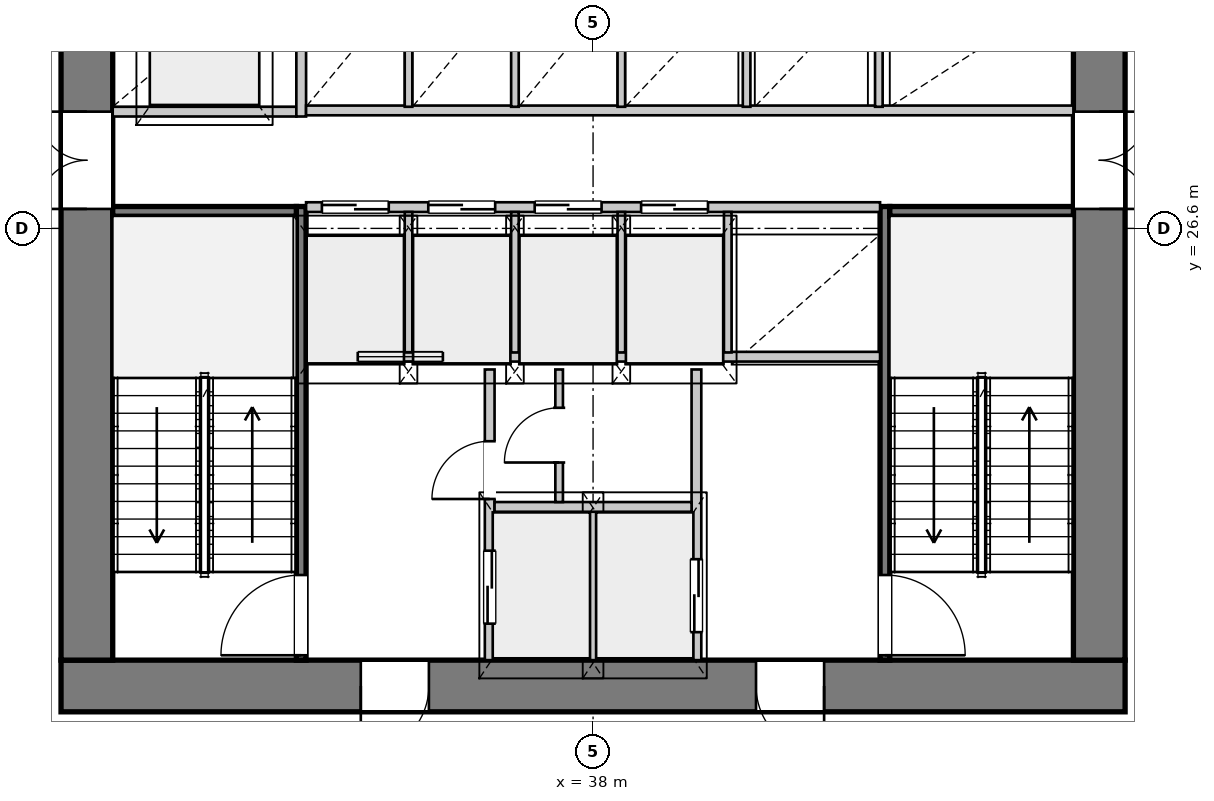
"""IFC4 building model, lengths in metres.
Left out: names, types, materials, properties, quantities, classifications, styles, units other than length and angle.
Written with IfcOpenShell. Run it as: python <this file> out.ifc"""

import sys

from ifc_helpers import new_model, si_unit, direction, frame, frame_2d, origin, place, context, subcontext, project, spatial, rectangle, extrude, source, transform, mapped, element, fill, save


model = new_model("IFC4")
c1 = context("Model", 3, precision=1e-05, world=origin(), true_north=direction((0.0, 1.0)))
c2 = subcontext(c1, "Body", "Model", "MODEL_VIEW")
j1 = project(units=[si_unit("LENGTHUNIT", "METRE"), si_unit("PLANEANGLEUNIT", "RADIAN")], contexts=[c1])
p1 = place(None, origin())
s1 = spatial("IfcSite", under=j1, at=p1, CompositionType="ELEMENT")
p2 = place(p1, origin())
s2 = spatial("IfcBuilding", under=s1, at=p2, CompositionType="ELEMENT")
p3 = place(p2, frame((0.0, 0.0, 75.9)))
s3 = spatial("IfcBuildingStorey", under=s2, at=p3, CompositionType="ELEMENT", Elevation=75.9)
p4 = place(p3, frame((46.75, 19.075, 0.0), z_axis=(0.0, 0.0, 1.0), x_axis=(-1.0, 0.0, 0.0)))
e1 = element("IfcWall", 1, at=p4, inside=s3, PredefinedType="SHEAR", context=c2, shape_type="SweptSolid", body=[
    extrude(rectangle(XDim=17.5, YDim=0.85, at=frame_2d((8.75, 0.0))), origin(), (0.0, 0.0, 1.0), 3.58),
])
p5 = place(p4, frame((4.95, 0.0, 0.0)))
e2 = element("IfcOpeningElement", 2, at=p5, cuts=e1, PredefinedType="OPENING", context=c2, shape_type="SweptSolid", body=[
    extrude(rectangle(XDim=1.12, YDim=2.25, at=frame_2d((0.56, 1.125))), frame((0.0, 0.435, 0.0), z_axis=(0.0, -1.0, 0.0), x_axis=(1.0, 0.0, 0.0)), (0.0, 0.0, 1.0), 0.87),
])
p6 = place(p4, frame((11.45, 0.0, 0.0)))
e3 = element("IfcOpeningElement", 3, at=p6, cuts=e1, PredefinedType="OPENING", context=c2, shape_type="SweptSolid", body=[
    extrude(rectangle(XDim=1.12, YDim=2.25, at=frame_2d((0.56, 1.125))), frame((0.0, 0.435, 0.0), z_axis=(0.0, -1.0, 0.0), x_axis=(1.0, 0.0, 0.0)), (0.0, 0.0, 1.0), 0.87),
])
p7 = place(p3, frame((29.675, 19.5, 0.0), z_axis=(0.0, 0.0, 1.0), x_axis=(0.0, 1.0, 0.0)))
e4 = element("IfcWall", 4, at=p7, inside=s3, PredefinedType="SHEAR", context=c2, shape_type="SweptSolid", body=[
    extrude(rectangle(XDim=14.2, YDim=0.85, at=frame_2d((7.1, 0.0))), origin(), (0.0, 0.0, 1.0), 3.58),
])
p8 = place(p7, frame((7.42, 0.0, 0.0)))
e5 = element("IfcOpeningElement", 5, at=p8, cuts=e4, PredefinedType="OPENING", context=c2, shape_type="SweptSolid", body=[
    extrude(rectangle(XDim=1.6, YDim=2.2, at=frame_2d((0.8, 1.1))), frame((0.0, 0.435, 0.0), z_axis=(0.0, -1.0, 0.0), x_axis=(1.0, 0.0, 0.0)), (0.0, 0.0, 1.0), 0.87),
])
p9 = place(p3, frame((46.325, 33.7, 0.0), z_axis=(0.0, 0.0, 1.0), x_axis=(0.0, -1.0, 0.0)))
e6 = element("IfcWall", 6, at=p9, inside=s3, PredefinedType="SHEAR", context=c2, shape_type="SweptSolid", body=[
    extrude(rectangle(XDim=14.2, YDim=0.85, at=frame_2d((7.1, 0.0))), origin(), (0.0, 0.0, 1.0), 3.58),
])
p10 = place(p9, frame((5.18, 0.0, 0.0)))
e7 = element("IfcOpeningElement", 7, at=p10, cuts=e6, PredefinedType="OPENING", context=c2, shape_type="SweptSolid", body=[
    extrude(rectangle(XDim=1.6, YDim=2.2, at=frame_2d((0.8, 1.1))), frame((0.0, 0.435, 0.0), z_axis=(0.0, -1.0, 0.0), x_axis=(1.0, 0.0, 0.0)), (0.0, 0.0, 1.0), 0.87),
])
p11 = place(p3, frame((33.2, 19.5, 0.0), z_axis=(0.0, 0.0, 1.0), x_axis=(0.0, 1.0, 0.0)))
e8 = element("IfcWall", 8, at=p11, inside=s3, PredefinedType="PARTITIONING", context=c2, shape_type="SweptSolid", body=[
    extrude(rectangle(XDim=7.46, YDim=0.16, at=frame_2d((3.73, 0.0))), origin(), (0.0, 0.0, 1.0), 3.58),
])
p12 = place(p11, frame((0.08, 0.0, 0.0)))
e9 = element("IfcOpeningElement", 9, at=p12, cuts=e8, PredefinedType="OPENING", context=c2, shape_type="SweptSolid", body=[
    extrude(rectangle(XDim=1.32, YDim=2.2, at=frame_2d((0.66, 1.1))), frame((0.0, 0.09, 0.0), z_axis=(0.0, -1.0, 0.0), x_axis=(1.0, 0.0, 0.0)), (0.0, 0.0, 1.0), 0.18),
])
p13 = place(p3, frame((30.1, 26.88, 0.0), z_axis=(0.0, 0.0, 1.0), x_axis=(1.0, 0.0, 0.0)))
e10 = element("IfcWall", 10, at=p13, inside=s3, PredefinedType="PARTITIONING", context=c2, shape_type="SweptSolid", body=[
    extrude(rectangle(XDim=3.02, YDim=0.16, at=frame_2d((1.51, 0.0))), origin(), (0.0, 0.0, 1.0), 3.58),
])
p14 = place(p3, frame((42.8, 26.96, 0.0), z_axis=(0.0, 0.0, 1.0), x_axis=(0.0, -1.0, 0.0)))
e11 = element("IfcWall", 11, at=p14, inside=s3, PredefinedType="PARTITIONING", context=c2, shape_type="SweptSolid", body=[
    extrude(rectangle(XDim=7.46, YDim=0.16, at=frame_2d((3.73, 0.0))), origin(), (0.0, 0.0, 1.0), 3.58),
])
p15 = place(p14, frame((6.06, 0.0, 0.0)))
e12 = element("IfcOpeningElement", 12, at=p15, cuts=e11, PredefinedType="OPENING", context=c2, shape_type="SweptSolid", body=[
    extrude(rectangle(XDim=1.32, YDim=2.2, at=frame_2d((0.66, 1.1))), frame((0.0, 0.09, 0.0), z_axis=(0.0, -1.0, 0.0), x_axis=(1.0, 0.0, 0.0)), (0.0, 0.0, 1.0), 0.18),
])
p16 = place(p3, frame((42.88, 26.88, 0.0), z_axis=(0.0, 0.0, 1.0), x_axis=(1.0, 0.0, 0.0)))
e13 = element("IfcWall", 13, at=p16, inside=s3, PredefinedType="PARTITIONING", context=c2, shape_type="SweptSolid", body=[
    extrude(rectangle(XDim=3.02, YDim=0.16, at=frame_2d((1.51, 0.0))), origin(), (0.0, 0.0, 1.0), 3.58),
])
p17 = place(p3, frame((36.3, 19.5, 0.0), z_axis=(0.0, 0.0, 1.0), x_axis=(0.0, 1.0, 0.0)))
e14 = element("IfcWall", 14, at=p17, inside=s3, PredefinedType="PARTITIONING", context=c2, shape_type="SweptSolid", body=[
    extrude(rectangle(XDim=4.78, YDim=0.16, at=frame_2d((2.39, 0.0))), origin(), (0.0, 0.0, 1.0), 3.58),
])
p18 = place(p17, frame((0.6, 0.0, 0.0)))
e15 = element("IfcOpeningElement", 15, at=p18, cuts=e14, PredefinedType="OPENING", context=c2, shape_type="SweptSolid", body=[
    extrude(rectangle(XDim=1.2, YDim=2.2, at=frame_2d((0.6, 1.1))), frame((0.0, 0.09, 0.0), z_axis=(0.0, -1.0, 0.0), x_axis=(1.0, 0.0, 0.0)), (0.0, 0.0, 1.0), 0.18),
])
p19 = place(p17, frame((2.65, 0.0, 0.0)))
e16 = element("IfcOpeningElement", 16, at=p19, cuts=e14, PredefinedType="OPENING", context=c2, shape_type="SweptSolid", body=[
    extrude(rectangle(XDim=0.95, YDim=2.1, at=frame_2d((0.475, 1.05))), frame((0.0, 0.09, 0.0), z_axis=(0.0, -1.0, 0.0), x_axis=(1.0, 0.0, 0.0)), (0.0, 0.0, 1.0), 0.18),
])
p20 = place(p3, frame((39.7, 24.28, 0.0), z_axis=(0.0, 0.0, 1.0), x_axis=(0.0, -1.0, 0.0)))
e17 = element("IfcWall", 17, at=p20, inside=s3, PredefinedType="PARTITIONING", context=c2, shape_type="SweptSolid", body=[
    extrude(rectangle(XDim=4.78, YDim=0.16, at=frame_2d((2.39, 0.0))), origin(), (0.0, 0.0, 1.0), 3.58),
])
p21 = place(p20, frame((3.12, 0.0, 0.0)))
e18 = element("IfcOpeningElement", 18, at=p21, cuts=e17, PredefinedType="OPENING", context=c2, shape_type="SweptSolid", body=[
    extrude(rectangle(XDim=1.2, YDim=2.2, at=frame_2d((0.6, 1.1))), frame((0.0, 0.09, 0.0), z_axis=(0.0, -1.0, 0.0), x_axis=(1.0, 0.0, 0.0)), (0.0, 0.0, 1.0), 0.18),
])
p22 = place(p3, frame((38.0, 19.5, 0.0), z_axis=(0.0, 0.0, 1.0), x_axis=(0.0, 1.0, 0.0)))
e19 = element("IfcWall", 19, at=p22, inside=s3, PredefinedType="PARTITIONING", context=c2, shape_type="SweptSolid", body=[
    extrude(rectangle(XDim=2.46, YDim=0.125, at=frame_2d((1.23, 0.0))), origin(), (0.0, 0.0, 1.0), 3.58),
])
p23 = place(p3, frame((36.38, 22.02, 0.0), z_axis=(0.0, 0.0, 1.0), x_axis=(1.0, 0.0, 0.0)))
e20 = element("IfcWall", 20, at=p23, inside=s3, PredefinedType="PARTITIONING", context=c2, shape_type="SweptSolid", body=[
    extrude(rectangle(XDim=3.24, YDim=0.16, at=frame_2d((1.62, 0.0))), origin(), (0.0, 0.0, 1.0), 3.58),
])
p24 = place(p3, frame((33.28, 24.49, 0.0), z_axis=(0.0, 0.0, 1.0), x_axis=(1.0, 0.0, 0.0)))
e21 = element("IfcWall", 21, at=p24, inside=s3, PredefinedType="PARTITIONING", context=c2, shape_type="SweptSolid", body=[
    extrude(rectangle(XDim=9.44, YDim=0.16, at=frame_2d((4.72, 0.0))), origin(), (0.0, 0.0, 1.0), 3.58),
])
p25 = place(p24, frame((0.85, 0.0, 0.95)))
e22 = element("IfcOpeningElement", 22, at=p25, cuts=e21, PredefinedType="OPENING", context=c2, shape_type="SweptSolid", body=[
    extrude(rectangle(XDim=1.4, YDim=1.8, at=frame_2d((0.7, 0.9))), frame((0.0, 0.09, 0.0), z_axis=(0.0, -1.0, 0.0), x_axis=(1.0, 0.0, 0.0)), (0.0, 0.0, 1.0), 0.18),
])
p26 = place(p3, frame((37.442, 22.1, 0.0), z_axis=(0.0, 0.0, 1.0), x_axis=(0.0, 1.0, 0.0)))
e23 = element("IfcWall", 23, at=p26, inside=s3, PredefinedType="PARTITIONING", context=c2, shape_type="SweptSolid", body=[
    extrude(rectangle(XDim=2.18, YDim=0.125, at=frame_2d((1.09, 0.0))), origin(), (0.0, 0.0, 1.0), 3.58),
])
p27 = place(p26, frame((0.65, 0.0, 0.0)))
e24 = element("IfcOpeningElement", 24, at=p27, cuts=e23, PredefinedType="OPENING", context=c2, shape_type="SweptSolid", body=[
    extrude(rectangle(XDim=0.9, YDim=2.1, at=frame_2d((0.45, 1.05))), frame((0.0, 0.073, 0.0), z_axis=(0.0, -1.0, 0.0), x_axis=(1.0, 0.0, 0.0)), (0.0, 0.0, 1.0), 0.145),
])
p28 = place(p3, frame((30.1, 28.52, 0.0), z_axis=(0.0, 0.0, 1.0), x_axis=(1.0, 0.0, 0.0)))
e25 = element("IfcWall", 25, at=p28, inside=s3, PredefinedType="PARTITIONING", context=c2, shape_type="SweptSolid", body=[
    extrude(rectangle(XDim=3.02, YDim=0.16, at=frame_2d((1.51, 0.0))), origin(), (0.0, 0.0, 1.0), 3.58),
])
p29 = place(p3, frame((33.2, 28.44, 0.0), z_axis=(0.0, 0.0, 1.0), x_axis=(0.0, 1.0, 0.0)))
e26 = element("IfcWall", 26, at=p29, inside=s3, PredefinedType="PARTITIONING", context=c2, shape_type="SweptSolid", body=[
    extrude(rectangle(XDim=5.26, YDim=0.16, at=frame_2d((2.63, 0.0))), origin(), (0.0, 0.0, 1.0), 3.58),
])
p30 = place(p3, frame((33.28, 26.95, 0.0), z_axis=(0.0, 0.0, 1.0), x_axis=(1.0, 0.0, 0.0)))
e27 = element("IfcWall", 27, at=p30, inside=s3, PredefinedType="PARTITIONING", context=c2, shape_type="SweptSolid", body=[
    extrude(rectangle(XDim=9.44, YDim=0.16, at=frame_2d((4.72, 0.0))), origin(), (0.0, 0.0, 1.0), 3.58),
])
p31 = place(p30, frame((0.26, 0.0, 0.0)))
e28 = element("IfcOpeningElement", 28, at=p31, cuts=e27, PredefinedType="OPENING", context=c2, shape_type="SweptSolid", body=[
    extrude(rectangle(XDim=1.1, YDim=2.2, at=frame_2d((0.55, 1.1))), frame((0.0, 0.09, 0.0), z_axis=(0.0, -1.0, 0.0), x_axis=(1.0, 0.0, 0.0)), (0.0, 0.0, 1.0), 0.18),
])
p32 = place(p30, frame((2.01, 0.0, 0.0)))
e29 = element("IfcOpeningElement", 29, at=p32, cuts=e27, PredefinedType="OPENING", context=c2, shape_type="SweptSolid", body=[
    extrude(rectangle(XDim=1.1, YDim=2.2, at=frame_2d((0.55, 1.1))), frame((0.0, 0.09, 0.0), z_axis=(0.0, -1.0, 0.0), x_axis=(1.0, 0.0, 0.0)), (0.0, 0.0, 1.0), 0.18),
])
p33 = place(p30, frame((3.76, 0.0, 0.0)))
e30 = element("IfcOpeningElement", 30, at=p33, cuts=e27, PredefinedType="OPENING", context=c2, shape_type="SweptSolid", body=[
    extrude(rectangle(XDim=1.1, YDim=2.2, at=frame_2d((0.55, 1.1))), frame((0.0, 0.09, 0.0), z_axis=(0.0, -1.0, 0.0), x_axis=(1.0, 0.0, 0.0)), (0.0, 0.0, 1.0), 0.18),
])
p34 = place(p30, frame((5.51, 0.0, 0.0)))
e31 = element("IfcOpeningElement", 31, at=p34, cuts=e27, PredefinedType="OPENING", context=c2, shape_type="SweptSolid", body=[
    extrude(rectangle(XDim=1.1, YDim=2.2, at=frame_2d((0.55, 1.1))), frame((0.0, 0.09, 0.0), z_axis=(0.0, -1.0, 0.0), x_axis=(1.0, 0.0, 0.0)), (0.0, 0.0, 1.0), 0.18),
])
for number, where, z_axis, x_axis in (
    (32, (34.965, 24.56, 0.0), (0.0, 0.0, 1.0), (0.0, 1.0, 0.0)),
    (33, (36.715, 24.56, 0.0), (0.0, 0.0, 1.0), (0.0, 1.0, 0.0)),
    (34, (38.465, 24.56, 0.0), (0.0, 0.0, 1.0), (0.0, 1.0, 0.0)),
    (35, (40.215, 24.56, 0.0), (0.0, 0.0, 1.0), (0.0, 1.0, 0.0)),
):
    element("IfcWall", number, at=place(p3, frame(where, z_axis=z_axis, x_axis=x_axis)), inside=s3, PredefinedType="PARTITIONING", context=c2, shape_type="SweptSolid", body=[
        extrude(rectangle(XDim=2.31, YDim=0.125, at=frame_2d((1.155, 0.0))), origin(), (0.0, 0.0, 1.0), 3.58),
    ])
p35 = place(p3, frame((33.28, 28.54, 0.0), z_axis=(0.0, 0.0, 1.0), x_axis=(1.0, 0.0, 0.0)))
e36 = element("IfcWall", 36, at=p35, inside=s3, PredefinedType="PARTITIONING", context=c2, shape_type="SweptSolid", body=[
    extrude(rectangle(XDim=12.62, YDim=0.16, at=frame_2d((6.31, 0.0))), origin(), (0.0, 0.0, 1.0), 3.58),
])
for number, where, z_axis, x_axis in (
    (37, (34.965, 28.6, 0.0), (0.0, 0.0, 1.0), (0.0, 1.0, 0.0)),
    (38, (36.715, 28.6, 0.0), (0.0, 0.0, 1.0), (0.0, 1.0, 0.0)),
    (39, (38.465, 28.6, 0.0), (0.0, 0.0, 1.0), (0.0, 1.0, 0.0)),
    (40, (40.525, 28.6, 0.0), (0.0, 0.0, 1.0), (0.0, 1.0, 0.0)),
    (41, (42.7, 28.6, 0.0), (0.0, 0.0, 1.0), (0.0, 1.0, 0.0)),
):
    element("IfcWall", number, at=place(p3, frame(where, z_axis=z_axis, x_axis=x_axis)), inside=s3, PredefinedType="PARTITIONING", context=c2, shape_type="SweptSolid", body=[
        extrude(rectangle(XDim=1.92, YDim=0.125, at=frame_2d((0.96, 0.0))), origin(), (0.0, 0.0, 1.0), 3.58),
    ])
m1 = source(origin(), c2, "Body", "SweptSolid", [
    extrude(rectangle(XDim=1.12, YDim=2.25, at=frame_2d((0.56, 1.125))), frame((0.0, 0.025, 0.0), z_axis=(0.0, -1.0, 0.0), x_axis=(1.0, 0.0, 0.0)), (0.0, 0.0, 1.0), 0.05),
])
p36 = place(p5, origin())
e42 = element("IfcDoor", 42, at=p36, inside=s3, OperationType="SINGLE_SWING_LEFT", PredefinedType="DOOR", context=c2, shape_type="MappedRepresentation", body=[
    mapped(m1, transform((0.0, 0.0, 0.0), x_axis=(1.0, 0.0, 0.0), y_axis=(0.0, 1.0, 0.0), z_axis=(0.0, 0.0, 1.0), scale=1.0)),
])
fill(e2, e42)
p37 = place(p6, origin())
e43 = element("IfcDoor", 43, at=p37, inside=s3, OperationType="SINGLE_SWING_RIGHT", PredefinedType="DOOR", context=c2, shape_type="MappedRepresentation", body=[
    mapped(m1, transform((0.0, 0.0, 0.0), x_axis=(1.0, 0.0, 0.0), y_axis=(0.0, 1.0, 0.0), z_axis=(0.0, 0.0, 1.0), scale=1.0)),
])
fill(e3, e43)
m2 = source(origin(), c2, "Body", "SweptSolid", [
    extrude(rectangle(XDim=1.6, YDim=2.2, at=frame_2d((0.8, 1.1))), frame((0.0, 0.025, 0.0), z_axis=(0.0, -1.0, 0.0), x_axis=(1.0, 0.0, 0.0)), (0.0, 0.0, 1.0), 0.05),
])
p38 = place(p8, origin())
e44 = element("IfcDoor", 44, at=p38, inside=s3, OperationType="DOUBLE_DOOR_SINGLE_SWING", PredefinedType="DOOR", context=c2, shape_type="MappedRepresentation", body=[
    mapped(m2, transform((0.0, 0.0, 0.0), x_axis=(1.0, 0.0, 0.0), y_axis=(0.0, 1.0, 0.0), z_axis=(0.0, 0.0, 1.0), scale=1.0)),
])
fill(e5, e44)
p39 = place(p10, origin())
e45 = element("IfcDoor", 45, at=p39, inside=s3, OperationType="DOUBLE_DOOR_SINGLE_SWING", PredefinedType="DOOR", context=c2, shape_type="MappedRepresentation", body=[
    mapped(m2, transform((0.0, 0.0, 0.0), x_axis=(1.0, 0.0, 0.0), y_axis=(0.0, 1.0, 0.0), z_axis=(0.0, 0.0, 1.0), scale=1.0)),
])
fill(e7, e45)
m3 = source(origin(), c2, "Body", "SweptSolid", [
    extrude(rectangle(XDim=1.32, YDim=2.2, at=frame_2d((0.66, 1.1))), frame((0.0, 0.025, 0.0), z_axis=(0.0, -1.0, 0.0), x_axis=(1.0, 0.0, 0.0)), (0.0, 0.0, 1.0), 0.05),
])
p40 = place(p12, origin())
e46 = element("IfcDoor", 46, at=p40, inside=s3, OperationType="SINGLE_SWING_LEFT", PredefinedType="DOOR", context=c2, shape_type="MappedRepresentation", body=[
    mapped(m3, transform((0.0, 0.0, 0.0), x_axis=(1.0, 0.0, 0.0), y_axis=(0.0, 1.0, 0.0), z_axis=(0.0, 0.0, 1.0), scale=1.0)),
])
fill(e9, e46)
p41 = place(p15, origin())
e47 = element("IfcDoor", 47, at=p41, inside=s3, OperationType="SINGLE_SWING_RIGHT", PredefinedType="DOOR", context=c2, shape_type="MappedRepresentation", body=[
    mapped(m3, transform((0.0, 0.0, 0.0), x_axis=(1.0, 0.0, 0.0), y_axis=(0.0, 1.0, 0.0), z_axis=(0.0, 0.0, 1.0), scale=1.0)),
])
fill(e12, e47)
m4 = source(origin(), c2, "Body", "SweptSolid", [
    extrude(rectangle(XDim=1.2, YDim=2.2, at=frame_2d((0.6, 1.1))), frame((0.0, 0.025, 0.0), z_axis=(0.0, -1.0, 0.0), x_axis=(1.0, 0.0, 0.0)), (0.0, 0.0, 1.0), 0.05),
])
p42 = place(p18, origin())
e48 = element("IfcDoor", 48, at=p42, inside=s3, OperationType="DOUBLE_DOOR_SLIDING", PredefinedType="DOOR", context=c2, shape_type="MappedRepresentation", body=[
    mapped(m4, transform((0.0, 0.0, 0.0), x_axis=(1.0, 0.0, 0.0), y_axis=(0.0, 1.0, 0.0), z_axis=(0.0, 0.0, 1.0), scale=1.0)),
])
fill(e15, e48)
m5 = source(origin(), c2, "Body", "SweptSolid", [
    extrude(rectangle(XDim=0.95, YDim=2.1, at=frame_2d((0.475, 1.05))), frame((0.0, 0.025, 0.0), z_axis=(0.0, -1.0, 0.0), x_axis=(1.0, 0.0, 0.0)), (0.0, 0.0, 1.0), 0.05),
])
p43 = place(p19, origin())
e49 = element("IfcDoor", 49, at=p43, inside=s3, OperationType="SINGLE_SWING_LEFT", PredefinedType="DOOR", context=c2, shape_type="MappedRepresentation", body=[
    mapped(m5, transform((0.0, 0.0, 0.0), x_axis=(1.0, 0.0, 0.0), y_axis=(0.0, 1.0, 0.0), z_axis=(0.0, 0.0, 1.0), scale=1.0)),
])
fill(e16, e49)
m6 = source(origin(), c2, "Body", "SweptSolid", [
    extrude(rectangle(XDim=0.9, YDim=2.1, at=frame_2d((0.45, 1.05))), frame((0.0, 0.025, 0.0), z_axis=(0.0, -1.0, 0.0), x_axis=(1.0, 0.0, 0.0)), (0.0, 0.0, 1.0), 0.05),
])
p44 = place(p27, origin())
e50 = element("IfcDoor", 50, at=p44, inside=s3, OperationType="SINGLE_SWING_LEFT", PredefinedType="DOOR", context=c2, shape_type="MappedRepresentation", body=[
    mapped(m6, transform((0.0, 0.0, 0.0), x_axis=(1.0, 0.0, 0.0), y_axis=(0.0, 1.0, 0.0), z_axis=(0.0, 0.0, 1.0), scale=1.0)),
])
fill(e24, e50)
p45 = place(p21, origin())
e51 = element("IfcDoor", 51, at=p45, inside=s3, OperationType="DOUBLE_DOOR_SLIDING", PredefinedType="DOOR", context=c2, shape_type="MappedRepresentation", body=[
    mapped(m4, transform((0.0, 0.0, 0.0), x_axis=(1.0, 0.0, 0.0), y_axis=(0.0, 1.0, 0.0), z_axis=(0.0, 0.0, 1.0), scale=1.0)),
])
fill(e18, e51)
m7 = source(origin(), c2, "Body", "SweptSolid", [
    extrude(rectangle(XDim=1.1, YDim=2.2, at=frame_2d((0.55, 1.1))), frame((0.0, 0.025, 0.0), z_axis=(0.0, -1.0, 0.0), x_axis=(1.0, 0.0, 0.0)), (0.0, 0.0, 1.0), 0.05),
])
p46 = place(p31, origin())
e52 = element("IfcDoor", 52, at=p46, inside=s3, OperationType="DOUBLE_DOOR_SLIDING", PredefinedType="DOOR", context=c2, shape_type="MappedRepresentation", body=[
    mapped(m7, transform((0.0, 0.0, 0.0), x_axis=(1.0, 0.0, 0.0), y_axis=(0.0, 1.0, 0.0), z_axis=(0.0, 0.0, 1.0), scale=1.0)),
])
fill(e28, e52)
p47 = place(p32, origin())
e53 = element("IfcDoor", 53, at=p47, inside=s3, OperationType="DOUBLE_DOOR_SLIDING", PredefinedType="DOOR", context=c2, shape_type="MappedRepresentation", body=[
    mapped(m7, transform((0.0, 0.0, 0.0), x_axis=(1.0, 0.0, 0.0), y_axis=(0.0, 1.0, 0.0), z_axis=(0.0, 0.0, 1.0), scale=1.0)),
])
fill(e29, e53)
p48 = place(p33, origin())
e54 = element("IfcDoor", 54, at=p48, inside=s3, OperationType="DOUBLE_DOOR_SLIDING", PredefinedType="DOOR", context=c2, shape_type="MappedRepresentation", body=[
    mapped(m7, transform((0.0, 0.0, 0.0), x_axis=(1.0, 0.0, 0.0), y_axis=(0.0, 1.0, 0.0), z_axis=(0.0, 0.0, 1.0), scale=1.0)),
])
fill(e30, e54)
p49 = place(p34, origin())
e55 = element("IfcDoor", 55, at=p49, inside=s3, OperationType="DOUBLE_DOOR_SLIDING", PredefinedType="DOOR", context=c2, shape_type="MappedRepresentation", body=[
    mapped(m7, transform((0.0, 0.0, 0.0), x_axis=(1.0, 0.0, 0.0), y_axis=(0.0, 1.0, 0.0), z_axis=(0.0, 0.0, 1.0), scale=1.0)),
])
fill(e31, e55)
m8 = source(origin(), c2, "Body", "SweptSolid", [
    extrude(rectangle(XDim=1.4, YDim=1.8, at=frame_2d((0.7, 0.9))), frame((0.0, 0.03, 0.0), z_axis=(0.0, -1.0, 0.0), x_axis=(1.0, 0.0, 0.0)), (0.0, 0.0, 1.0), 0.06),
])
p50 = place(p25, origin())
e56 = element("IfcWindow", 56, at=p50, inside=s3, PartitioningType="SINGLE_PANEL", PredefinedType="WINDOW", context=c2, shape_type="MappedRepresentation", body=[
    mapped(m8, transform((0.0, 0.0, 0.0), x_axis=(1.0, 0.0, 0.0), y_axis=(0.0, 1.0, 0.0), z_axis=(0.0, 0.0, 1.0), scale=1.0)),
])
fill(e22, e56)
save(model, sys.argv[1])
